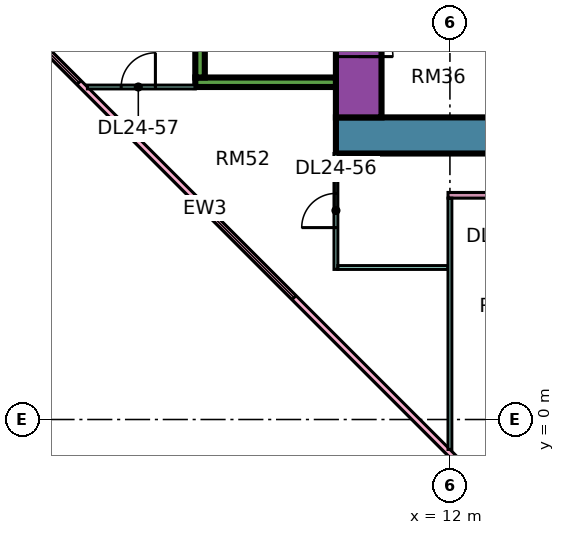
"""IFC4 building model, lengths in metres.
Left out: names, types, materials, properties, quantities, classifications, styles, units other than length and angle.
Written with IfcOpenShell. Run it as: python <this file> out.ifc"""

import sys

from ifc_helpers import new_model, si_unit, direction, frame, frame_2d, origin, place, context, subcontext, project, spatial, rectangle, extrude, element, fill, save


model = new_model("IFC4")
c1 = context("Model", 3, precision=1e-05, world=origin(), true_north=direction((0.0, 1.0)))
c2 = subcontext(c1, "Body", "Model", "MODEL_VIEW")
j1 = project(units=[si_unit("LENGTHUNIT", "METRE"), si_unit("PLANEANGLEUNIT", "RADIAN")], contexts=[c1])
p1 = place(None, origin())
s1 = spatial("IfcSite", under=j1, at=p1, CompositionType="ELEMENT")
p2 = place(p1, origin())
s2 = spatial("IfcBuilding", under=s1, at=p2, CompositionType="ELEMENT")
p3 = place(p2, frame((0.0, 0.0, 106.9)))
s3 = spatial("IfcBuildingStorey", under=s2, at=p3, CompositionType="ELEMENT", Elevation=106.9)
p4 = place(p3, frame((9.0, 7.475, 0.0), z_axis=(0.0, 0.0, 1.0), x_axis=(1.0, 0.0, 0.0)))
e1 = element("IfcWall", 1, at=p4, inside=s3, PredefinedType="SHEAR", context=c2, shape_type="SweptSolid", body=[
    extrude(rectangle(XDim=25.0, YDim=0.95, at=frame_2d((12.5, 0.0))), origin(), (0.0, 0.0, 1.0), 3.75),
])
p5 = place(p3, frame((9.6, 7.95, 0.0), z_axis=(0.0, 0.0, 1.0), x_axis=(0.0, 1.0, 0.0)))
e2 = element("IfcWall", 2, at=p5, inside=s3, PredefinedType="SHEAR", context=c2, shape_type="SweptSolid", body=[
    extrude(rectangle(XDim=11.1, YDim=1.2, at=frame_2d((5.55, 0.0))), origin(), (0.0, 0.0, 1.0), 3.75),
])
p6 = place(p5, frame((3.925, 0.0, 0.0)))
e3 = element("IfcOpeningElement", 3, at=p6, cuts=e2, PredefinedType="OPENING", context=c2, shape_type="SweptSolid", body=[
    extrude(rectangle(XDim=1.1, YDim=2.2, at=frame_2d((0.55, 1.1))), frame((0.0, 0.61, 0.0), z_axis=(0.0, -1.0, 0.0), x_axis=(1.0, 0.0, 0.0)), (0.0, 0.0, 1.0), 1.22),
])
p7 = place(p5, frame((6.425, 0.0, 0.0)))
e4 = element("IfcOpeningElement", 4, at=p7, cuts=e2, PredefinedType="OPENING", context=c2, shape_type="SweptSolid", body=[
    extrude(rectangle(XDim=1.1, YDim=2.2, at=frame_2d((0.55, 1.1))), frame((0.0, 0.61, 0.0), z_axis=(0.0, -1.0, 0.0), x_axis=(1.0, 0.0, 0.0)), (0.0, 0.0, 1.0), 1.22),
])
p8 = place(p5, frame((9.175, 0.0, 0.0)))
e5 = element("IfcOpeningElement", 5, at=p8, cuts=e2, PredefinedType="OPENING", context=c2, shape_type="SweptSolid", body=[
    extrude(rectangle(XDim=1.1, YDim=2.2, at=frame_2d((0.55, 1.1))), frame((0.0, 0.61, 0.0), z_axis=(0.0, -1.0, 0.0), x_axis=(1.0, 0.0, 0.0)), (0.0, 0.0, 1.0), 1.22),
])
p9 = place(p5, frame((1.6, 0.0, 0.0)))
e6 = element("IfcOpeningElement", 6, at=p9, cuts=e2, PredefinedType="OPENING", context=c2, shape_type="SweptSolid", body=[
    extrude(rectangle(XDim=0.9, YDim=2.1, at=frame_2d((0.45, 1.05))), frame((0.0, 0.61, 0.0), z_axis=(0.0, -1.0, 0.0), x_axis=(1.0, 0.0, 0.0)), (0.0, 0.0, 1.0), 1.22),
])
p10 = place(p3, frame((5.3, 8.875, 0.0), z_axis=(0.0, 0.0, 1.0), x_axis=(1.0, 0.0, 0.0)))
e7 = element("IfcWall", 7, at=p10, inside=s3, PredefinedType="SHEAR", context=c2, shape_type="SweptSolid", body=[
    extrude(rectangle(XDim=3.7, YDim=0.25, at=frame_2d((1.85, 0.0))), origin(), (0.0, 0.0, 1.0), 3.75),
])
p11 = place(p3, frame((5.425, 9.0, 0.0), z_axis=(0.0, 0.0, 1.0), x_axis=(0.0, 1.0, 0.0)))
e8 = element("IfcWall", 8, at=p11, inside=s3, PredefinedType="SHEAR", context=c2, shape_type="SweptSolid", body=[
    extrude(rectangle(XDim=4.0, YDim=0.25, at=frame_2d((2.0, 0.0))), origin(), (0.0, 0.0, 1.0), 3.75),
])
p12 = place(p3, frame((-1.447, 12.553, 0.0), z_axis=(0.0, 0.0, 1.0), x_axis=(0.707106781187, -0.707106781187, 0.0)))
e9 = element("IfcWall", 9, at=p12, inside=s3, PredefinedType="SOLIDWALL", context=c2, shape_type="SweptSolid", body=[
    extrude(rectangle(XDim=19.799, YDim=0.15, at=frame_2d((9.899, 0.0))), origin(), (0.0, 0.0, 1.0), 3.35),
])
p13 = place(p12, frame((2.212, 0.0, 0.45)))
e10 = element("IfcOpeningElement", 10, at=p13, cuts=e9, PredefinedType="OPENING", context=c2, shape_type="SweptSolid", body=[
    extrude(rectangle(XDim=3.0, YDim=2.4, at=frame_2d((1.5, 1.2))), frame((0.0, 0.085, 0.0), z_axis=(0.0, -1.0, 0.0), x_axis=(1.0, 0.0, 0.0)), (0.0, 0.0, 1.0), 0.17),
])
p14 = place(p12, frame((10.216, 0.0, 0.45)))
e11 = element("IfcOpeningElement", 11, at=p14, cuts=e9, PredefinedType="OPENING", context=c2, shape_type="SweptSolid", body=[
    extrude(rectangle(XDim=3.0, YDim=2.4, at=frame_2d((1.5, 1.2))), frame((0.0, 0.085, 0.0), z_axis=(0.0, -1.0, 0.0), x_axis=(1.0, 0.0, 0.0)), (0.0, 0.0, 1.0), 0.17),
])
p15 = place(p3, frame((2.461, 8.75, 0.0), z_axis=(0.0, 0.0, 1.0), x_axis=(1.0, 0.0, 0.0)))
e12 = element("IfcWall", 12, at=p15, inside=s3, PredefinedType="PARTITIONING", context=c2, shape_type="SweptSolid", body=[
    extrude(rectangle(XDim=2.839, YDim=0.1, at=frame_2d((1.419, 0.0))), origin(), (0.0, 0.0, 1.0), 3.35),
])
p16 = place(p15, frame((0.889, 0.0, 0.0)))
e13 = element("IfcOpeningElement", 13, at=p16, cuts=e12, PredefinedType="OPENING", context=c2, shape_type="SweptSolid", body=[
    extrude(rectangle(XDim=0.9, YDim=2.1, at=frame_2d((0.45, 1.05))), frame((0.0, 0.06, 0.0), z_axis=(0.0, -1.0, 0.0), x_axis=(1.0, 0.0, 0.0)), (0.0, 0.0, 1.0), 0.12),
])
p17 = place(p3, frame((9.0, 3.95, 0.0), z_axis=(0.0, 0.0, 1.0), x_axis=(0.0, 1.0, 0.0)))
e14 = element("IfcWall", 14, at=p17, inside=s3, PredefinedType="PARTITIONING", context=c2, shape_type="SweptSolid", body=[
    extrude(rectangle(XDim=3.05, YDim=0.1, at=frame_2d((1.525, 0.0))), origin(), (0.0, 0.0, 1.0), 3.35),
])
p18 = place(p17, frame((1.1, 0.0, 0.0)))
e15 = element("IfcOpeningElement", 15, at=p18, cuts=e14, PredefinedType="OPENING", context=c2, shape_type="SweptSolid", body=[
    extrude(rectangle(XDim=0.9, YDim=2.1, at=frame_2d((0.45, 1.05))), frame((0.0, 0.06, 0.0), z_axis=(0.0, -1.0, 0.0), x_axis=(1.0, 0.0, 0.0)), (0.0, 0.0, 1.0), 0.12),
])
p19 = place(p3, frame((9.05, 4.0, 0.0), z_axis=(0.0, 0.0, 1.0), x_axis=(1.0, 0.0, 0.0)))
e16 = element("IfcWall", 16, at=p19, inside=s3, PredefinedType="PARTITIONING", context=c2, shape_type="SweptSolid", body=[
    extrude(rectangle(XDim=2.9, YDim=0.1, at=frame_2d((1.45, 0.0))), origin(), (0.0, 0.0, 1.0), 3.35),
])
p20 = place(p3, frame((11.95, 5.9, 0.0), z_axis=(0.0, 0.0, 1.0), x_axis=(1.0, 0.0, 0.0)))
e17 = element("IfcWall", 17, at=p20, inside=s3, PredefinedType="PARTITIONING", context=c2, shape_type="SweptSolid", body=[
    extrude(rectangle(XDim=21.1, YDim=0.15, at=frame_2d((10.55, 0.0))), origin(), (0.0, 0.0, 1.0), 3.35),
])
p21 = place(p20, frame((1.1, 0.0, 0.0)))
e18 = element("IfcOpeningElement", 18, at=p21, cuts=e17, PredefinedType="OPENING", context=c2, shape_type="SweptSolid", body=[
    extrude(rectangle(XDim=0.9, YDim=2.1, at=frame_2d((0.45, 1.05))), frame((0.0, 0.085, 0.0), z_axis=(0.0, -1.0, 0.0), x_axis=(1.0, 0.0, 0.0)), (0.0, 0.0, 1.0), 0.17),
])
p22 = place(p20, frame((4.1, 0.0, 0.0)))
e19 = element("IfcOpeningElement", 19, at=p22, cuts=e17, PredefinedType="OPENING", context=c2, shape_type="SweptSolid", body=[
    extrude(rectangle(XDim=0.9, YDim=2.1, at=frame_2d((0.45, 1.05))), frame((0.0, 0.085, 0.0), z_axis=(0.0, -1.0, 0.0), x_axis=(1.0, 0.0, 0.0)), (0.0, 0.0, 1.0), 0.17),
])
p23 = place(p20, frame((10.1, 0.0, 0.0)))
e20 = element("IfcOpeningElement", 20, at=p23, cuts=e17, PredefinedType="OPENING", context=c2, shape_type="SweptSolid", body=[
    extrude(rectangle(XDim=0.9, YDim=2.1, at=frame_2d((0.45, 1.05))), frame((0.0, 0.085, 0.0), z_axis=(0.0, -1.0, 0.0), x_axis=(1.0, 0.0, 0.0)), (0.0, 0.0, 1.0), 0.17),
])
p24 = place(p20, frame((16.1, 0.0, 0.0)))
e21 = element("IfcOpeningElement", 21, at=p24, cuts=e17, PredefinedType="OPENING", context=c2, shape_type="SweptSolid", body=[
    extrude(rectangle(XDim=0.9, YDim=2.1, at=frame_2d((0.45, 1.05))), frame((0.0, 0.085, 0.0), z_axis=(0.0, -1.0, 0.0), x_axis=(1.0, 0.0, 0.0)), (0.0, 0.0, 1.0), 0.17),
])
p25 = place(p3, frame((12.0, -0.788, 0.0), z_axis=(0.0, 0.0, 1.0), x_axis=(0.0, 1.0, 0.0)))
e22 = element("IfcWall", 22, at=p25, inside=s3, PredefinedType="PARTITIONING", context=c2, shape_type="SweptSolid", body=[
    extrude(rectangle(XDim=6.613, YDim=0.1, at=frame_2d((3.306, 0.0))), origin(), (0.0, 0.0, 1.0), 3.35),
])
p26 = place(p13, origin())
e23 = element("IfcWindow", 23, at=p26, inside=s3, PartitioningType="SINGLE_PANEL", PredefinedType="WINDOW", context=c2, shape_type="SweptSolid", body=[
    extrude(rectangle(XDim=3.0, YDim=2.4, at=frame_2d((1.5, 1.2))), frame((0.0, 0.03, 0.0), z_axis=(0.0, -1.0, 0.0), x_axis=(1.0, 0.0, 0.0)), (0.0, 0.0, 1.0), 0.06),
])
fill(e10, e23)
p27 = place(p14, origin())
e24 = element("IfcWindow", 24, at=p27, inside=s3, PartitioningType="SINGLE_PANEL", PredefinedType="WINDOW", context=c2, shape_type="SweptSolid", body=[
    extrude(rectangle(XDim=3.0, YDim=2.4, at=frame_2d((1.5, 1.2))), frame((0.0, 0.03, 0.0), z_axis=(0.0, -1.0, 0.0), x_axis=(1.0, 0.0, 0.0)), (0.0, 0.0, 1.0), 0.06),
])
fill(e11, e24)
p28 = place(p9, frame((0.9, 0.0, 0.0), z_axis=(0.0, 0.0, 1.0), x_axis=(-1.0, 0.0, 0.0)))
e25 = element("IfcDoor", 25, at=p28, inside=s3, OperationType="SINGLE_SWING_LEFT", PredefinedType="DOOR", context=c2, shape_type="SweptSolid", body=[
    extrude(rectangle(XDim=0.9, YDim=2.1, at=frame_2d((0.45, 1.05))), frame((0.0, 0.025, 0.0), z_axis=(0.0, -1.0, 0.0), x_axis=(1.0, 0.0, 0.0)), (0.0, 0.0, 1.0), 0.05),
])
fill(e6, e25)
p29 = place(p18, origin())
e26 = element("IfcDoor", 26, at=p29, inside=s3, OperationType="SINGLE_SWING_LEFT", PredefinedType="DOOR", context=c2, shape_type="SweptSolid", body=[
    extrude(rectangle(XDim=0.9, YDim=2.1, at=frame_2d((0.45, 1.05))), frame((0.0, 0.025, 0.0), z_axis=(0.0, -1.0, 0.0), x_axis=(1.0, 0.0, 0.0)), (0.0, 0.0, 1.0), 0.05),
])
fill(e15, e26)
p30 = place(p16, frame((0.9, 0.0, 0.0), z_axis=(0.0, 0.0, 1.0), x_axis=(-1.0, 0.0, 0.0)))
e27 = element("IfcDoor", 27, at=p30, inside=s3, OperationType="SINGLE_SWING_RIGHT", PredefinedType="DOOR", context=c2, shape_type="SweptSolid", body=[
    extrude(rectangle(XDim=0.9, YDim=2.1, at=frame_2d((0.45, 1.05))), frame((0.0, 0.025, 0.0), z_axis=(0.0, -1.0, 0.0), x_axis=(1.0, 0.0, 0.0)), (0.0, 0.0, 1.0), 0.05),
])
fill(e13, e27)
save(model, sys.argv[1])
